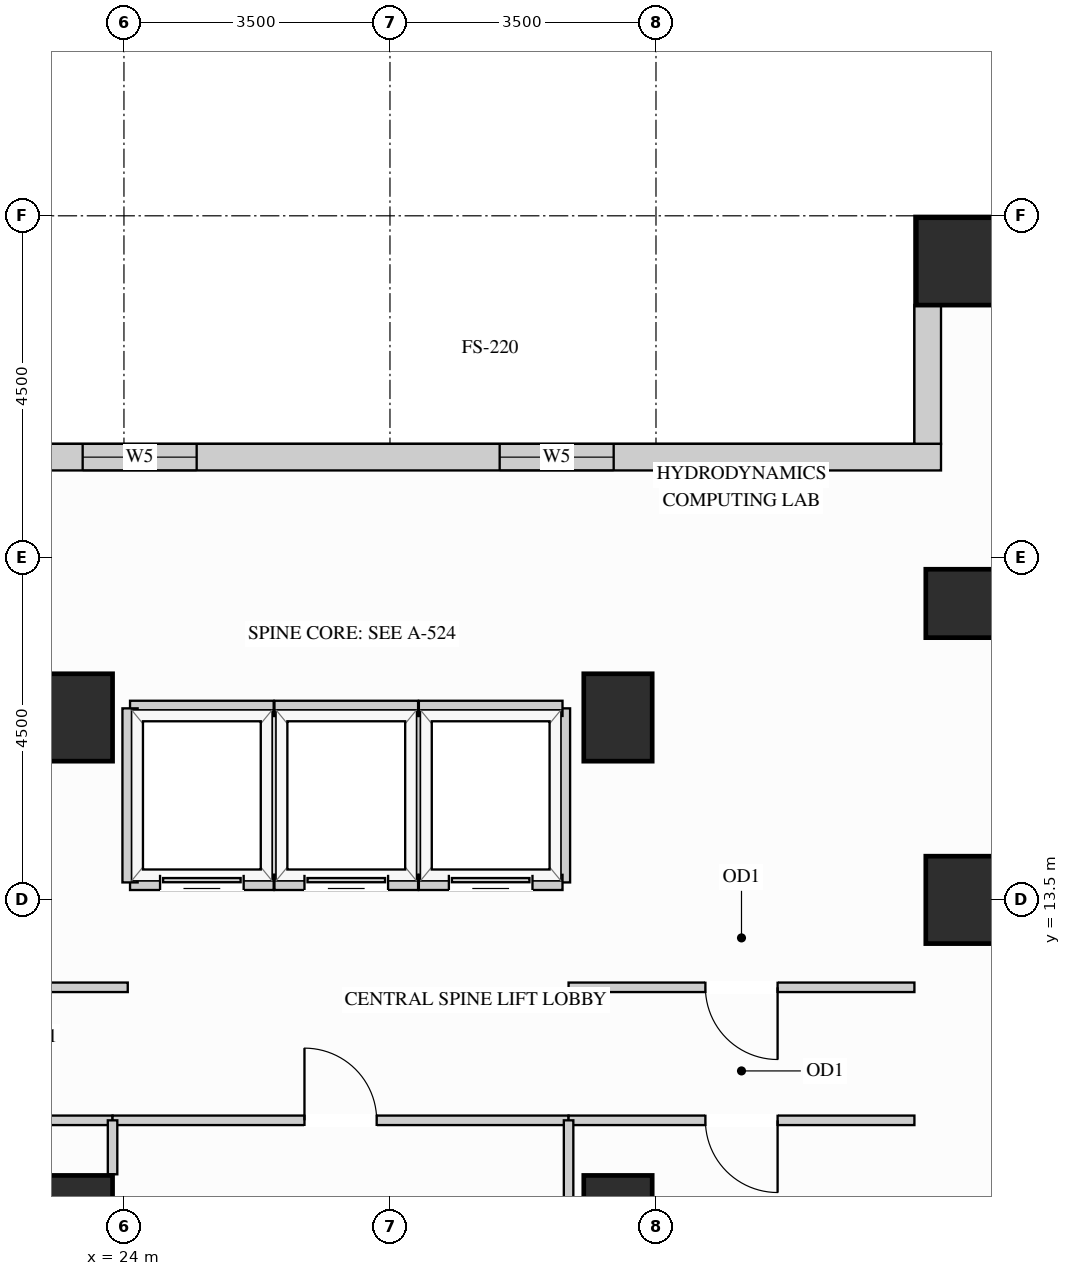
"""IFC4 building model, lengths in metres.
Left out: names, types, materials, properties, quantities, classifications, styles, units other than length and angle.
Written with IfcOpenShell. Run it as: python <this file> out.ifc"""

import sys

from ifc_helpers import new_model, si_unit, direction, frame, frame_2d, origin, origin_2d, place, context, subcontext, project, spatial, rectangle, extrude, source, transform, mapped, element, fill, save


model = new_model("IFC4")
c1 = context("Model", 3, precision=1e-05, world=origin(), true_north=direction((0.0, 1.0)))
c2 = subcontext(c1, "Body", "Model", "MODEL_VIEW")
j1 = project(units=[si_unit("LENGTHUNIT", "METRE"), si_unit("PLANEANGLEUNIT", "RADIAN")], contexts=[c1])
p1 = place(None, origin())
s1 = spatial("IfcSite", under=j1, at=p1, CompositionType="ELEMENT")
p2 = place(p1, origin())
s2 = spatial("IfcBuilding", under=s1, at=p2, CompositionType="ELEMENT")
p3 = place(p2, frame((0.0, 0.0, 95.4)))
s3 = spatial("IfcBuildingStorey", under=s2, at=p3, CompositionType="ELEMENT", Elevation=95.4)
m1 = source(origin(), c2, "Body", "SweptSolid", [
    extrude(rectangle(XDim=0.9, YDim=0.9, at=origin_2d()), origin(), (0.0, 0.0, 1.0), 3.38),
])
p4 = place(p3, frame((35.0, 17.4, 0.0), z_axis=(0.0, 0.0, 1.0), x_axis=(1.0, 0.0, 0.0)))
e1 = element("IfcColumn", 1, at=p4, inside=s3, PredefinedType="COLUMN", context=c2, shape_type="MappedRepresentation", body=[
    mapped(m1, transform((0.0, 0.0, 0.0), x_axis=(1.0, 0.0, 0.0), y_axis=(0.0, 1.0, 0.0), z_axis=(0.0, 0.0, 1.0))),
])
m2 = source(origin(), c2, "Body", "SweptSolid", [
    extrude(rectangle(XDim=0.9, YDim=1.15, at=origin_2d()), origin(), (0.0, 0.0, 1.0), 3.38),
])
for number, where, z_axis, x_axis in (
    (2, (35.0, 13.5, 0.0), (0.0, 0.0, 1.0), (1.0, 0.0, 0.0)),
    (3, (23.4, 15.9, 0.0), (0.0, 0.0, 1.0), (1.0, 0.0, 0.0)),
    (4, (23.4, 9.3, 0.0), (0.0, 0.0, 1.0), (1.0, 0.0, 0.0)),
    (5, (30.5, 15.9, 0.0), (0.0, 0.0, 1.0), (1.0, 0.0, 0.0)),
    (6, (30.5, 9.3, 0.0), (0.0, 0.0, 1.0), (1.0, 0.0, 0.0)),
):
    element("IfcColumn", number, at=place(p3, frame(where, z_axis=z_axis, x_axis=x_axis)), inside=s3, PredefinedType="COLUMN", context=c2, shape_type="MappedRepresentation", body=[
        mapped(m2, transform((0.0, 0.0, 0.0), x_axis=(1.0, 0.0, 0.0), y_axis=(0.0, 1.0, 0.0), z_axis=(0.0, 0.0, 1.0))),
    ])
m3 = source(origin(), c2, "Body", "SweptSolid", [
    extrude(rectangle(XDim=1.15, YDim=1.15, at=origin_2d()), origin(), (0.0, 0.0, 1.0), 3.38),
])
p5 = place(p3, frame((35.0, 21.9, 0.0), z_axis=(0.0, 0.0, 1.0), x_axis=(1.0, 0.0, 0.0)))
e7 = element("IfcColumn", 7, at=p5, inside=s3, PredefinedType="COLUMN", context=c2, shape_type="MappedRepresentation", body=[
    mapped(m3, transform((0.0, 0.0, 0.0), x_axis=(1.0, 0.0, 0.0), y_axis=(0.0, 1.0, 0.0), z_axis=(0.0, 0.0, 1.0))),
])
m4 = source(origin(), c2, "Body", "SweptSolid", [
    extrude(rectangle(XDim=1.829, YDim=0.35, at=frame_2d((0.915, 0.0))), origin(), (0.0, 0.0, 1.0), 3.365),
])
p6 = place(p3, frame((34.575, 21.327, 0.0), z_axis=(0.0, 0.0, 1.0), x_axis=(0.0, -1.0, 0.0)))
e8 = element("IfcWall", 8, at=p6, inside=s3, PredefinedType="SOLIDWALL", context=c2, shape_type="MappedRepresentation", body=[
    mapped(m4, transform((0.0, 0.0, 0.0), x_axis=(1.0, 0.0, 0.0), y_axis=(0.0, 1.0, 0.0), z_axis=(0.0, 0.0, 1.0))),
])
p7 = place(p3, frame((34.75, 19.325, 0.0), z_axis=(0.0, 0.0, 1.0), x_axis=(-1.0, 0.0, 0.0)))
e9 = element("IfcWall", 9, at=p7, inside=s3, PredefinedType="SOLIDWALL", context=c2, shape_type="SweptSolid", body=[
    extrude(rectangle(XDim=15.6, YDim=0.35, at=frame_2d((7.8, 0.0))), origin(), (0.0, 0.0, 1.0), 3.365),
])
p8 = place(p7, frame((4.307, 0.0, 0.78)))
e10 = element("IfcOpeningElement", 10, at=p8, cuts=e9, PredefinedType="OPENING", context=c2, shape_type="SweptSolid", body=[
    extrude(rectangle(XDim=1.5, YDim=2.0, at=frame_2d((0.75, 1.0))), frame((0.0, 0.185, 0.0), z_axis=(0.0, -1.0, 0.0), x_axis=(1.0, 0.0, 0.0)), (0.0, 0.0, 1.0), 0.37),
])
p9 = place(p7, frame((9.793, 0.0, 0.78)))
e11 = element("IfcOpeningElement", 11, at=p9, cuts=e9, PredefinedType="OPENING", context=c2, shape_type="SweptSolid", body=[
    extrude(rectangle(XDim=1.5, YDim=2.0, at=frame_2d((0.75, 1.0))), frame((0.0, 0.185, 0.0), z_axis=(0.0, -1.0, 0.0), x_axis=(1.0, 0.0, 0.0)), (0.0, 0.0, 1.0), 0.37),
])
p10 = place(p3, frame((29.85, 12.35, 0.0), z_axis=(0.0, 0.0, 1.0), x_axis=(1.0, 0.0, 0.0)))
e12 = element("IfcWall", 12, at=p10, inside=s3, PredefinedType="PARTITIONING", context=c2, shape_type="SweptSolid", body=[
    extrude(rectangle(XDim=4.55, YDim=0.125, at=frame_2d((2.275, 0.0))), origin(), (0.0, 0.0, 1.0), 3.365),
])
p11 = place(p10, frame((1.8, 0.0, 0.0)))
e13 = element("IfcOpeningElement", 13, at=p11, cuts=e12, PredefinedType="OPENING", context=c2, shape_type="SweptSolid", body=[
    extrude(rectangle(XDim=0.95, YDim=2.15, at=frame_2d((0.475, 1.075))), frame((0.0, 0.073, 0.0), z_axis=(0.0, -1.0, 0.0), x_axis=(1.0, 0.0, 0.0)), (0.0, 0.0, 1.0), 0.145),
])
p12 = place(p3, frame((19.5, 12.35, 0.0), z_axis=(0.0, 0.0, 1.0), x_axis=(1.0, 0.0, 0.0)))
e14 = element("IfcWall", 14, at=p12, inside=s3, PredefinedType="PARTITIONING", context=c2, shape_type="SweptSolid", body=[
    extrude(rectangle(XDim=4.55, YDim=0.125, at=frame_2d((2.275, 0.0))), origin(), (0.0, 0.0, 1.0), 3.365),
])
p13 = place(p12, frame((1.8, 0.0, 0.0)))
e15 = element("IfcOpeningElement", 15, at=p13, cuts=e14, PredefinedType="OPENING", context=c2, shape_type="SweptSolid", body=[
    extrude(rectangle(XDim=0.95, YDim=2.15, at=frame_2d((0.475, 1.075))), frame((0.0, 0.073, 0.0), z_axis=(0.0, -1.0, 0.0), x_axis=(1.0, 0.0, 0.0)), (0.0, 0.0, 1.0), 0.145),
])
p14 = place(p3, frame((19.5, 10.6, 0.0), z_axis=(0.0, 0.0, 1.0), x_axis=(1.0, 0.0, 0.0)))
e16 = element("IfcWall", 16, at=p14, inside=s3, PredefinedType="PARTITIONING", context=c2, shape_type="SweptSolid", body=[
    extrude(rectangle(XDim=4.35, YDim=0.125, at=frame_2d((2.175, 0.0))), origin(), (0.0, 0.0, 1.0), 3.365),
])
p15 = place(p14, frame((1.7, 0.0, 0.0)))
e17 = element("IfcOpeningElement", 17, at=p15, cuts=e16, PredefinedType="OPENING", context=c2, shape_type="SweptSolid", body=[
    extrude(rectangle(XDim=0.95, YDim=2.15, at=frame_2d((0.475, 1.075))), frame((0.0, 0.073, 0.0), z_axis=(0.0, -1.0, 0.0), x_axis=(1.0, 0.0, 0.0)), (0.0, 0.0, 1.0), 0.145),
])
p16 = place(p3, frame((23.85, 10.6, 0.0), z_axis=(0.0, 0.0, 1.0), x_axis=(1.0, 0.0, 0.0)))
e18 = element("IfcWall", 18, at=p16, inside=s3, PredefinedType="PARTITIONING", context=c2, shape_type="SweptSolid", body=[
    extrude(rectangle(XDim=6.0, YDim=0.125, at=frame_2d((3.0, 0.0))), origin(), (0.0, 0.0, 1.0), 3.365),
])
p17 = place(p16, frame((2.525, 0.0, 0.0)))
e19 = element("IfcOpeningElement", 19, at=p17, cuts=e18, PredefinedType="OPENING", context=c2, shape_type="SweptSolid", body=[
    extrude(rectangle(XDim=0.95, YDim=2.15, at=frame_2d((0.475, 1.075))), frame((0.0, 0.073, 0.0), z_axis=(0.0, -1.0, 0.0), x_axis=(1.0, 0.0, 0.0)), (0.0, 0.0, 1.0), 0.145),
])
p18 = place(p3, frame((29.85, 10.6, 0.0), z_axis=(0.0, 0.0, 1.0), x_axis=(1.0, 0.0, 0.0)))
e20 = element("IfcWall", 20, at=p18, inside=s3, PredefinedType="PARTITIONING", context=c2, shape_type="SweptSolid", body=[
    extrude(rectangle(XDim=4.55, YDim=0.125, at=frame_2d((2.275, 0.0))), origin(), (0.0, 0.0, 1.0), 3.365),
])
p19 = place(p18, frame((1.8, 0.0, 0.0)))
e21 = element("IfcOpeningElement", 21, at=p19, cuts=e20, PredefinedType="OPENING", context=c2, shape_type="SweptSolid", body=[
    extrude(rectangle(XDim=0.95, YDim=2.15, at=frame_2d((0.475, 1.075))), frame((0.0, 0.073, 0.0), z_axis=(0.0, -1.0, 0.0), x_axis=(1.0, 0.0, 0.0)), (0.0, 0.0, 1.0), 0.145),
])
m5 = source(origin(), c2, "Body", "SweptSolid", [
    extrude(rectangle(XDim=0.71, YDim=0.125, at=frame_2d((0.355, 0.0))), origin(), (0.0, 0.0, 1.0), 3.365),
])
p20 = place(p3, frame((23.85, 9.89, 0.0), z_axis=(0.0, 0.0, 1.0), x_axis=(0.0, 1.0, 0.0)))
e22 = element("IfcWall", 22, at=p20, inside=s3, PredefinedType="PARTITIONING", context=c2, shape_type="MappedRepresentation", body=[
    mapped(m5, transform((0.0, 0.0, 0.0), x_axis=(1.0, 0.0, 0.0), y_axis=(0.0, 1.0, 0.0), z_axis=(0.0, 0.0, 1.0))),
])
m6 = source(origin(), c2, "Body", "SweptSolid", [
    extrude(rectangle(XDim=1.748, YDim=0.125, at=frame_2d((0.874, 0.0))), origin(), (0.0, 0.0, 1.0), 3.365),
])
p21 = place(p3, frame((29.85, 8.852, 0.0), z_axis=(0.0, 0.0, 1.0), x_axis=(0.0, 1.0, 0.0)))
e23 = element("IfcWall", 23, at=p21, inside=s3, PredefinedType="PARTITIONING", context=c2, shape_type="MappedRepresentation", body=[
    mapped(m6, transform((0.0, 0.0, 0.0), x_axis=(1.0, 0.0, 0.0), y_axis=(0.0, 1.0, 0.0), z_axis=(0.0, 0.0, 1.0))),
])
m7 = source(origin(), c2, "Body", "SweptSolid", [
    extrude(rectangle(XDim=2.29, YDim=0.2, at=frame_2d((1.145, 0.0))), origin(), (0.0, 0.0, 1.0), 3.365),
])
p22 = place(p3, frame((25.97, 13.73, 0.0), z_axis=(0.0, 0.0, 1.0), x_axis=(0.0, 1.0, 0.0)))
e24 = element("IfcWall", 24, at=p22, inside=s3, PredefinedType="PARTITIONING", context=c2, shape_type="MappedRepresentation", body=[
    mapped(m7, transform((0.0, 0.0, 0.0), x_axis=(1.0, 0.0, 0.0), y_axis=(0.0, 1.0, 0.0), z_axis=(0.0, 0.0, 1.0))),
])
m8 = source(origin(), c2, "Body", "SweptSolid", [
    extrude(rectangle(XDim=1.89, YDim=0.2, at=frame_2d((0.945, 0.0))), origin(), (0.0, 0.0, 1.0), 2.677),
])
p23 = place(p3, frame((24.08, 16.02, 0.0), z_axis=(0.0, 0.0, 1.0), x_axis=(1.0, 0.0, 0.0)))
e25 = element("IfcWall", 25, at=p23, inside=s3, PredefinedType="PARTITIONING", context=c2, shape_type="MappedRepresentation", body=[
    mapped(m8, transform((0.0, 0.0, 0.0), x_axis=(1.0, 0.0, 0.0), y_axis=(0.0, 1.0, 0.0), z_axis=(0.0, 0.0, 1.0))),
])
p24 = place(p3, frame((24.08, 13.73, 0.0), z_axis=(0.0, 0.0, 1.0), x_axis=(1.0, 0.0, 0.0)))
e26 = element("IfcWall", 26, at=p24, inside=s3, PredefinedType="PARTITIONING", context=c2, shape_type="SweptSolid", body=[
    extrude(rectangle(XDim=1.89, YDim=0.2, at=frame_2d((0.945, 0.0))), origin(), (0.0, 0.0, 1.0), 2.446),
])
p25 = place(p24, frame((0.395, 0.0, 0.0)))
e27 = element("IfcOpeningElement", 27, at=p25, cuts=e26, PredefinedType="OPENING", context=c2, shape_type="SweptSolid", body=[
    extrude(rectangle(XDim=1.1, YDim=2.2, at=frame_2d((0.55, 1.1))), frame((0.0, 0.11, 0.0), z_axis=(0.0, -1.0, 0.0), x_axis=(1.0, 0.0, 0.0)), (0.0, 0.0, 1.0), 0.22),
])
for number, where, z_axis, x_axis in (
    (28, (24.08, 13.73, 0.0), (0.0, 0.0, 1.0), (0.0, 1.0, 0.0)),
    (29, (27.87, 13.73, 0.0), (0.0, 0.0, 1.0), (0.0, 1.0, 0.0)),
):
    element("IfcWall", number, at=place(p3, frame(where, z_axis=z_axis, x_axis=x_axis)), inside=s3, PredefinedType="PARTITIONING", context=c2, shape_type="MappedRepresentation", body=[
        mapped(m7, transform((0.0, 0.0, 0.0), x_axis=(1.0, 0.0, 0.0), y_axis=(0.0, 1.0, 0.0), z_axis=(0.0, 0.0, 1.0))),
    ])
m9 = source(origin(), c2, "Body", "SweptSolid", [
    extrude(rectangle(XDim=1.89, YDim=0.2, at=frame_2d((0.945, 0.0))), origin(), (0.0, 0.0, 1.0), 2.677),
])
p26 = place(p3, frame((25.98, 16.02, 0.0), z_axis=(0.0, 0.0, 1.0), x_axis=(1.0, 0.0, 0.0)))
e30 = element("IfcWall", 30, at=p26, inside=s3, PredefinedType="PARTITIONING", context=c2, shape_type="MappedRepresentation", body=[
    mapped(m9, transform((0.0, 0.0, 0.0), x_axis=(1.0, 0.0, 0.0), y_axis=(0.0, 1.0, 0.0), z_axis=(0.0, 0.0, 1.0))),
])
p27 = place(p3, frame((25.98, 13.73, 0.0), z_axis=(0.0, 0.0, 1.0), x_axis=(1.0, 0.0, 0.0)))
e31 = element("IfcWall", 31, at=p27, inside=s3, PredefinedType="PARTITIONING", context=c2, shape_type="SweptSolid", body=[
    extrude(rectangle(XDim=1.89, YDim=0.2, at=frame_2d((0.945, 0.0))), origin(), (0.0, 0.0, 1.0), 2.446),
])
p28 = place(p27, frame((0.395, 0.0, 0.0)))
e32 = element("IfcOpeningElement", 32, at=p28, cuts=e31, PredefinedType="OPENING", context=c2, shape_type="SweptSolid", body=[
    extrude(rectangle(XDim=1.1, YDim=2.2, at=frame_2d((0.55, 1.1))), frame((0.0, 0.11, 0.0), z_axis=(0.0, -1.0, 0.0), x_axis=(1.0, 0.0, 0.0)), (0.0, 0.0, 1.0), 0.22),
])
p29 = place(p3, frame((29.77, 13.73, 0.0), z_axis=(0.0, 0.0, 1.0), x_axis=(0.0, 1.0, 0.0)))
e33 = element("IfcWall", 33, at=p29, inside=s3, PredefinedType="PARTITIONING", context=c2, shape_type="MappedRepresentation", body=[
    mapped(m7, transform((0.0, 0.0, 0.0), x_axis=(1.0, 0.0, 0.0), y_axis=(0.0, 1.0, 0.0), z_axis=(0.0, 0.0, 1.0))),
])
p30 = place(p3, frame((27.88, 16.02, 0.0), z_axis=(0.0, 0.0, 1.0), x_axis=(1.0, 0.0, 0.0)))
e34 = element("IfcWall", 34, at=p30, inside=s3, PredefinedType="PARTITIONING", context=c2, shape_type="MappedRepresentation", body=[
    mapped(m9, transform((0.0, 0.0, 0.0), x_axis=(1.0, 0.0, 0.0), y_axis=(0.0, 1.0, 0.0), z_axis=(0.0, 0.0, 1.0))),
])
p31 = place(p3, frame((27.88, 13.73, 0.0), z_axis=(0.0, 0.0, 1.0), x_axis=(1.0, 0.0, 0.0)))
e35 = element("IfcWall", 35, at=p31, inside=s3, PredefinedType="PARTITIONING", context=c2, shape_type="SweptSolid", body=[
    extrude(rectangle(XDim=1.89, YDim=0.2, at=frame_2d((0.945, 0.0))), origin(), (0.0, 0.0, 1.0), 2.446),
])
p32 = place(p31, frame((0.395, 0.0, 0.0)))
e36 = element("IfcOpeningElement", 36, at=p32, cuts=e35, PredefinedType="OPENING", context=c2, shape_type="SweptSolid", body=[
    extrude(rectangle(XDim=1.1, YDim=2.2, at=frame_2d((0.55, 1.1))), frame((0.0, 0.11, 0.0), z_axis=(0.0, -1.0, 0.0), x_axis=(1.0, 0.0, 0.0)), (0.0, 0.0, 1.0), 0.22),
])
m10 = source(origin(), c2, "Body", "SweptSolid", [
    extrude(rectangle(XDim=1.1, YDim=2.2, at=frame_2d((0.55, 1.1))), frame((0.0, 0.025, 0.0), z_axis=(0.0, -1.0, 0.0), x_axis=(1.0, 0.0, 0.0)), (0.0, 0.0, 1.0), 0.05),
])
p33 = place(p25, origin())
e37 = element("IfcDoor", 37, at=p33, inside=s3, OperationType="SLIDING_TO_LEFT", PredefinedType="DOOR", context=c2, shape_type="MappedRepresentation", body=[
    mapped(m10, transform((0.0, 0.0, 0.0), x_axis=(1.0, 0.0, 0.0), y_axis=(0.0, 1.0, 0.0), z_axis=(0.0, 0.0, 1.0))),
])
fill(e27, e37)
p34 = place(p28, origin())
e38 = element("IfcDoor", 38, at=p34, inside=s3, OperationType="SLIDING_TO_LEFT", PredefinedType="DOOR", context=c2, shape_type="MappedRepresentation", body=[
    mapped(m10, transform((0.0, 0.0, 0.0), x_axis=(1.0, 0.0, 0.0), y_axis=(0.0, 1.0, 0.0), z_axis=(0.0, 0.0, 1.0))),
])
fill(e32, e38)
p35 = place(p32, origin())
e39 = element("IfcDoor", 39, at=p35, inside=s3, OperationType="SLIDING_TO_LEFT", PredefinedType="DOOR", context=c2, shape_type="MappedRepresentation", body=[
    mapped(m10, transform((0.0, 0.0, 0.0), x_axis=(1.0, 0.0, 0.0), y_axis=(0.0, 1.0, 0.0), z_axis=(0.0, 0.0, 1.0))),
])
fill(e36, e39)
m11 = source(origin(), c2, "Body", "SweptSolid", [
    extrude(rectangle(XDim=0.95, YDim=2.15, at=frame_2d((0.475, 1.075))), frame((0.0, 0.025, 0.0), z_axis=(0.0, -1.0, 0.0), x_axis=(1.0, 0.0, 0.0)), (0.0, 0.0, 1.0), 0.05),
])
p36 = place(p11, origin())
e40 = element("IfcDoor", 40, at=p36, inside=s3, OperationType="SINGLE_SWING_RIGHT", PredefinedType="DOOR", context=c2, shape_type="MappedRepresentation", body=[
    mapped(m11, transform((0.0, 0.0, 0.0), x_axis=(1.0, 0.0, 0.0), y_axis=(0.0, 1.0, 0.0), z_axis=(0.0, 0.0, 1.0))),
])
fill(e13, e40)
p37 = place(p17, origin())
e41 = element("IfcDoor", 41, at=p37, inside=s3, OperationType="SINGLE_SWING_LEFT", PredefinedType="DOOR", context=c2, shape_type="MappedRepresentation", body=[
    mapped(m11, transform((0.0, 0.0, 0.0), x_axis=(1.0, 0.0, 0.0), y_axis=(0.0, 1.0, 0.0), z_axis=(0.0, 0.0, 1.0))),
])
fill(e19, e41)
p38 = place(p19, origin())
e42 = element("IfcDoor", 42, at=p38, inside=s3, OperationType="SINGLE_SWING_RIGHT", PredefinedType="DOOR", context=c2, shape_type="MappedRepresentation", body=[
    mapped(m11, transform((0.0, 0.0, 0.0), x_axis=(1.0, 0.0, 0.0), y_axis=(0.0, 1.0, 0.0), z_axis=(0.0, 0.0, 1.0))),
])
fill(e21, e42)
m12 = source(origin(), c2, "Body", "SweptSolid", [
    extrude(rectangle(XDim=1.5, YDim=2.0, at=frame_2d((0.75, 1.0))), frame((0.0, 0.03, 0.0), z_axis=(0.0, -1.0, 0.0), x_axis=(1.0, 0.0, 0.0)), (0.0, 0.0, 1.0), 0.06),
])
p39 = place(p8, origin())
e43 = element("IfcWindow", 43, at=p39, inside=s3, PartitioningType="SINGLE_PANEL", PredefinedType="WINDOW", context=c2, shape_type="MappedRepresentation", body=[
    mapped(m12, transform((0.0, 0.0, 0.0), x_axis=(1.0, 0.0, 0.0), y_axis=(0.0, 1.0, 0.0), z_axis=(0.0, 0.0, 1.0))),
])
fill(e10, e43)
p40 = place(p9, origin())
e44 = element("IfcWindow", 44, at=p40, inside=s3, PartitioningType="SINGLE_PANEL", PredefinedType="WINDOW", context=c2, shape_type="MappedRepresentation", body=[
    mapped(m12, transform((0.0, 0.0, 0.0), x_axis=(1.0, 0.0, 0.0), y_axis=(0.0, 1.0, 0.0), z_axis=(0.0, 0.0, 1.0))),
])
fill(e11, e44)
save(model, sys.argv[1])
